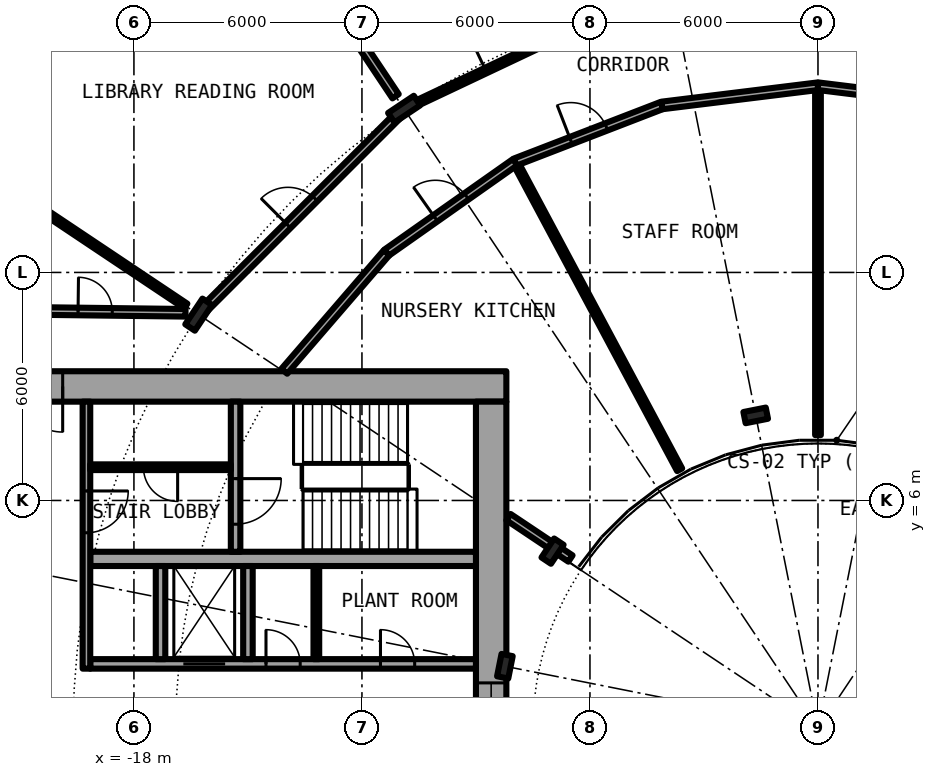
"""IFC4 building model, lengths in metres.
Left out: names, types, materials, properties, quantities, classifications, styles, units other than length and angle.
Written with IfcOpenShell. Run it as: python <this file> out.ifc"""

import sys

from ifc_helpers import new_model, si_unit, direction, frame, frame_2d, origin, origin_2d, place, context, subcontext, project, spatial, rectangle, i_section, extrude, element, fill, save


model = new_model("IFC4")
c1 = context("Model", 3, precision=1e-05, world=origin(), true_north=direction((0.0, 1.0)))
c2 = subcontext(c1, "Body", "Model", "MODEL_VIEW")
j1 = project(units=[si_unit("LENGTHUNIT", "METRE"), si_unit("PLANEANGLEUNIT", "RADIAN")], contexts=[c1])
p1 = place(None, origin())
s1 = spatial("IfcSite", under=j1, at=p1, CompositionType="ELEMENT")
p2 = place(p1, origin())
s2 = spatial("IfcBuilding", under=s1, at=p2, CompositionType="ELEMENT")
p3 = place(p2, frame((0.0, 0.0, 14.1)))
s3 = spatial("IfcBuildingStorey", under=s2, at=p3, CompositionType="ELEMENT", Elevation=14.1)
for number, where, z_axis, x_axis in (
    (1, (-10.889, 16.297, 0.0), (0.0, 0.0, 1.0), (-0.556, 0.831, 0.0)),
    (2, (-16.297, 10.889, 0.0), (0.0, 0.0, 1.0), (-0.831, 0.556, 0.0)),
):
    element("IfcColumn", number, at=place(p3, frame(where, z_axis=z_axis, x_axis=x_axis)), inside=s3, PredefinedType="COLUMN", context=c2, shape_type="SweptSolid", body=[
        extrude(i_section(OverallWidth=0.303, OverallDepth=0.814, WebThickness=0.021, FlangeThickness=0.04, FilletRadius=0.03, at=origin_2d()), origin(), (0.0, 0.0, 1.0), 4.2),
    ])
for number, where, z_axis, x_axis in (
    (3, (-1.639, 8.239, 0.0), (0.0, 0.0, 1.0), (-0.195, 0.981, 0.0)),
    (4, (-6.984, 4.667, 0.0), (0.0, 0.0, 1.0), (-0.831, 0.556, 0.0)),
    (5, (-8.239, 1.639, 0.0), (0.0, 0.0, 1.0), (-0.981, 0.195, 0.0)),
):
    element("IfcColumn", number, at=place(p3, frame(where, z_axis=z_axis, x_axis=x_axis)), inside=s3, PredefinedType="COLUMN", context=c2, shape_type="SweptSolid", body=[
        extrude(i_section(OverallWidth=0.3, OverallDepth=0.6, WebThickness=0.015, FlangeThickness=0.03, FilletRadius=0.027, at=origin_2d()), origin(), (0.0, 0.0, 1.0), 4.2),
    ])
p4 = place(p3, frame((-8.2, 9.0, 0.0), z_axis=(0.0, 0.0, 1.0), x_axis=(-1.0, 0.0, 0.0)))
e6 = element("IfcWall", 6, at=p4, inside=s3, PredefinedType="SHEAR", context=c2, shape_type="SweptSolid", body=[
    extrude(rectangle(XDim=14.2, YDim=0.8, at=frame_2d((7.1, 0.0))), origin(), (0.0, 0.0, 1.0), 4.2),
])
p5 = place(p4, frame((11.675, 0.0, 0.0)))
e7 = element("IfcOpeningElement", 7, at=p5, cuts=e6, PredefinedType="OPENING", context=c2, shape_type="SweptSolid", body=[
    extrude(rectangle(XDim=1.2, YDim=2.3, at=frame_2d((0.6, 1.15))), frame((0.0, 0.41, 0.0), z_axis=(0.0, -1.0, 0.0), x_axis=(1.0, 0.0, 0.0)), (0.0, 0.0, 1.0), 0.82),
])
p6 = place(p3, frame((-8.6, 8.6, 0.0), z_axis=(0.0, 0.0, 1.0), x_axis=(0.0, -1.0, 0.0)))
e8 = element("IfcWall", 8, at=p6, inside=s3, PredefinedType="SHEAR", context=c2, shape_type="SweptSolid", body=[
    extrude(rectangle(XDim=17.2, YDim=0.8, at=frame_2d((8.6, 0.0))), origin(), (0.0, 0.0, 1.0), 4.2),
])
p7 = place(p6, frame((7.4, 0.0, 0.1)))
e9 = element("IfcOpeningElement", 9, at=p7, cuts=e8, PredefinedType="OPENING", context=c2, shape_type="SweptSolid", body=[
    extrude(rectangle(XDim=2.4, YDim=2.2, at=frame_2d((1.2, 1.1))), frame((0.0, 0.41, 0.0), z_axis=(0.0, -1.0, 0.0), x_axis=(1.0, 0.0, 0.0)), (0.0, 0.0, 1.0), 0.82),
])
p8 = place(p3, frame((-19.15, 1.7, 0.0), z_axis=(0.0, 0.0, 1.0), x_axis=(1.0, 0.0, 0.0)))
e10 = element("IfcWall", 10, at=p8, inside=s3, PredefinedType="SHEAR", context=c2, shape_type="SweptSolid", body=[
    extrude(rectangle(XDim=10.15, YDim=0.25, at=frame_2d((5.075, 0.0))), origin(), (0.0, 0.0, 1.0), 4.2),
])
p9 = place(p8, frame((2.45, 0.0, 0.0)))
e11 = element("IfcOpeningElement", 11, at=p9, cuts=e10, PredefinedType="OPENING", context=c2, shape_type="SweptSolid", body=[
    extrude(rectangle(XDim=1.1, YDim=2.3, at=frame_2d((0.55, 1.15))), frame((0.0, 0.135, 0.0), z_axis=(0.0, -1.0, 0.0), x_axis=(1.0, 0.0, 0.0)), (0.0, 0.0, 1.0), 0.27),
])
p10 = place(p8, frame((7.637, 0.0, 0.0)))
e12 = element("IfcOpeningElement", 12, at=p10, cuts=e10, PredefinedType="OPENING", context=c2, shape_type="SweptSolid", body=[
    extrude(rectangle(XDim=0.9, YDim=2.3, at=frame_2d((0.45, 1.15))), frame((0.0, 0.135, 0.0), z_axis=(0.0, -1.0, 0.0), x_axis=(1.0, 0.0, 0.0)), (0.0, 0.0, 1.0), 0.27),
])
p11 = place(p8, frame((4.625, 0.0, 0.0)))
e13 = element("IfcOpeningElement", 13, at=p11, cuts=e10, PredefinedType="OPENING", context=c2, shape_type="SweptSolid", body=[
    extrude(rectangle(XDim=0.9, YDim=2.3, at=frame_2d((0.45, 1.15))), frame((0.0, 0.135, 0.0), z_axis=(0.0, -1.0, 0.0), x_axis=(1.0, 0.0, 0.0)), (0.0, 0.0, 1.0), 0.27),
])
p12 = place(p3, frame((-9.0, 4.462, 0.0), z_axis=(0.0, 0.0, 1.0), x_axis=(-1.0, 0.0, 0.0)))
e14 = element("IfcWall", 14, at=p12, inside=s3, PredefinedType="SHEAR", context=c2, shape_type="SweptSolid", body=[
    extrude(rectangle(XDim=10.15, YDim=0.375, at=frame_2d((5.075, 0.0))), origin(), (0.0, 0.0, 1.0), 4.2),
])
p13 = place(p3, frame((-15.325, 8.6, 0.0), z_axis=(0.0, 0.0, 1.0), x_axis=(0.0, -1.0, 0.0)))
e15 = element("IfcWall", 15, at=p13, inside=s3, PredefinedType="SHEAR", context=c2, shape_type="SweptSolid", body=[
    extrude(rectangle(XDim=3.95, YDim=0.25, at=frame_2d((1.975, 0.0))), origin(), (0.0, 0.0, 1.0), 4.2),
])
p14 = place(p13, frame((2.025, 0.0, 0.0)))
e16 = element("IfcOpeningElement", 16, at=p14, cuts=e15, PredefinedType="OPENING", context=c2, shape_type="SweptSolid", body=[
    extrude(rectangle(XDim=1.2, YDim=2.3, at=frame_2d((0.6, 1.15))), frame((0.0, 0.135, 0.0), z_axis=(0.0, -1.0, 0.0), x_axis=(1.0, 0.0, 0.0)), (0.0, 0.0, 1.0), 0.27),
])
for number, where, z_axis, x_axis in (
    (17, (-15.0, 1.825, 0.0), (0.0, 0.0, 1.0), (0.0, 1.0, 0.0)),
    (18, (-17.3, 1.825, 0.0), (0.0, 0.0, 1.0), (0.0, 1.0, 0.0)),
):
    element("IfcWall", number, at=place(p3, frame(where, z_axis=z_axis, x_axis=x_axis)), inside=s3, PredefinedType="SOLIDWALL", context=c2, shape_type="SweptSolid", body=[
        extrude(rectangle(XDim=2.45, YDim=0.25, at=frame_2d((1.225, 0.0))), origin(), (0.0, 0.0, 1.0), 3.8),
    ])
p15 = place(p3, frame((-19.25, 8.6, 0.0), z_axis=(0.0, 0.0, 1.0), x_axis=(0.0, -1.0, 0.0)))
e19 = element("IfcWall", 19, at=p15, inside=s3, PredefinedType="SOLIDWALL", context=c2, shape_type="SweptSolid", body=[
    extrude(rectangle(XDim=7.025, YDim=0.2, at=frame_2d((3.513, 0.0))), origin(), (0.0, 0.0, 1.0), 3.8),
])
p16 = place(p15, frame((2.35, 0.0, 0.0)))
e20 = element("IfcOpeningElement", 20, at=p16, cuts=e19, PredefinedType="OPENING", context=c2, shape_type="SweptSolid", body=[
    extrude(rectangle(XDim=1.1, YDim=2.3, at=frame_2d((0.55, 1.15))), frame((0.0, 0.11, 0.0), z_axis=(0.0, -1.0, 0.0), x_axis=(1.0, 0.0, 0.0)), (0.0, 0.0, 1.0), 0.22),
])
p17 = place(p3, frame((-13.2, 1.825, 0.0), z_axis=(0.0, 0.0, 1.0), x_axis=(0.0, 1.0, 0.0)))
e21 = element("IfcWall", 21, at=p17, inside=s3, PredefinedType="PARTITIONING", context=c2, shape_type="SweptSolid", body=[
    extrude(rectangle(XDim=2.45, YDim=0.15, at=frame_2d((1.225, 0.0))), origin(), (0.0, 0.0, 1.0), 3.8),
])
p18 = place(p3, frame((-15.45, 6.875, 0.0), z_axis=(0.0, 0.0, 1.0), x_axis=(-1.0, 0.0, 0.0)))
e22 = element("IfcWall", 22, at=p18, inside=s3, PredefinedType="PARTITIONING", context=c2, shape_type="SweptSolid", body=[
    extrude(rectangle(XDim=3.7, YDim=0.15, at=frame_2d((1.85, 0.0))), origin(), (0.0, 0.0, 1.0), 3.8),
])
p19 = place(p18, frame((1.4, 0.0, 0.0)))
e23 = element("IfcOpeningElement", 23, at=p19, cuts=e22, PredefinedType="OPENING", context=c2, shape_type="SweptSolid", body=[
    extrude(rectangle(XDim=0.9, YDim=2.3, at=frame_2d((0.45, 1.15))), frame((0.0, 0.085, 0.0), z_axis=(0.0, -1.0, 0.0), x_axis=(1.0, 0.0, 0.0)), (0.0, 0.0, 1.0), 0.17),
])
p20 = place(p3, frame((-22.595, 15.098, 0.0), z_axis=(0.0, 0.0, 1.0), x_axis=(0.831431488123, -0.555627285648, 0.0)))
e24 = element("IfcWall", 24, at=p20, inside=s3, PredefinedType="PARTITIONING", context=c2, shape_type="SweptSolid", body=[
    extrude(rectangle(XDim=7.168, YDim=0.15, at=frame_2d((3.584, 0.0))), origin(), (0.0, 0.0, 1.0), 3.8),
])
p21 = place(p3, frame((-12.222, 18.292, 0.0), z_axis=(0.0, 0.0, 1.0), x_axis=(0.555491592772, -0.831522152657, 0.0)))
e25 = element("IfcWall", 25, at=p21, inside=s3, PredefinedType="PARTITIONING", context=c2, shape_type="SweptSolid", body=[
    extrude(rectangle(XDim=1.993, YDim=0.2, at=frame_2d((0.996, 0.0))), origin(), (0.0, 0.0, 1.0), 3.8),
])
p22 = place(p3, frame((-7.968, 14.904, 0.0), z_axis=(0.0, 0.0, 1.0), x_axis=(0.471460365694, -0.881887251059, 0.0)))
e26 = element("IfcWall", 26, at=p22, inside=s3, PredefinedType="PARTITIONING", context=c2, shape_type="SweptSolid", body=[
    extrude(rectangle(XDim=9.18, YDim=0.15, at=frame_2d((4.59, 0.0))), origin(), (0.0, 0.0, 1.0), 3.8),
])
p23 = place(p3, frame((0.0, 7.72, 0.0), z_axis=(0.0, 0.0, 1.0), x_axis=(0.0, 1.0, 0.0)))
e27 = element("IfcWall", 27, at=p23, inside=s3, PredefinedType="PARTITIONING", context=c2, shape_type="SweptSolid", body=[
    extrude(rectangle(XDim=9.18, YDim=0.15, at=frame_2d((4.59, 0.0))), origin(), (0.0, 0.0, 1.0), 3.8),
])
p24 = place(p3, frame((-6.513, 4.472, 0.0), z_axis=(0.0, 0.0, 1.0), x_axis=(-0.831417956244, 0.555647533996, 0.0)))
e28 = element("IfcWall", 28, at=p24, inside=s3, PredefinedType="PARTITIONING", context=c2, shape_type="SweptSolid", body=[
    extrude(rectangle(XDim=1.962, YDim=0.2, at=frame_2d((0.981, 0.0))), origin(), (0.0, 0.0, 1.0), 3.8),
])
p25 = place(p3, frame((-21.675, 11.0, 0.0), z_axis=(0.0, 0.0, 1.0), x_axis=(0.999924074118, -0.012322580895, 0.0)))
e29 = element("IfcWall", 29, at=p25, inside=s3, PredefinedType="PARTITIONING", context=c2, shape_type="SweptSolid", body=[
    extrude(rectangle(XDim=5.032, YDim=0.2, at=frame_2d((2.516, 0.0))), origin(), (0.0, 0.0, 1.0), 3.8),
])
p26 = place(p25, frame((2.205, 0.0, 0.0)))
e30 = element("IfcOpeningElement", 30, at=p26, cuts=e29, PredefinedType="OPENING", context=c2, shape_type="SweptSolid", body=[
    extrude(rectangle(XDim=0.9, YDim=2.3, at=frame_2d((0.45, 1.15))), frame((0.0, 0.11, 0.0), z_axis=(0.0, -1.0, 0.0), x_axis=(1.0, 0.0, 0.0)), (0.0, 0.0, 1.0), 0.22),
])
p27 = place(p3, frame((-14.043, 9.4, 0.0), z_axis=(0.0, 0.0, 1.0), x_axis=(0.653274518104, 0.757121129012, 0.0)))
e31 = element("IfcWall", 31, at=p27, inside=s3, PredefinedType="PARTITIONING", context=c2, shape_type="SweptSolid", body=[
    extrude(rectangle(XDim=4.124, YDim=0.2, at=frame_2d((2.062, 0.0))), origin(), (0.0, 0.0, 1.0), 3.8),
])
p28 = place(p3, frame((-11.349, 12.522, 0.0), z_axis=(0.0, 0.0, 1.0), x_axis=(0.817567680547, 0.575832517079, 0.0)))
e32 = element("IfcWall", 32, at=p28, inside=s3, PredefinedType="PARTITIONING", context=c2, shape_type="SweptSolid", body=[
    extrude(rectangle(XDim=4.137, YDim=0.2, at=frame_2d((2.068, 0.0))), origin(), (0.0, 0.0, 1.0), 3.8),
])
p29 = place(p28, frame((1.568, 0.0, 0.0)))
e33 = element("IfcOpeningElement", 33, at=p29, cuts=e32, PredefinedType="OPENING", context=c2, shape_type="SweptSolid", body=[
    extrude(rectangle(XDim=1.0, YDim=2.3, at=frame_2d((0.5, 1.15))), frame((0.0, 0.11, 0.0), z_axis=(0.0, -1.0, 0.0), x_axis=(1.0, 0.0, 0.0)), (0.0, 0.0, 1.0), 0.22),
])
p30 = place(p3, frame((-7.967, 14.904, 0.0), z_axis=(0.0, 0.0, 1.0), x_axis=(0.932943640288, 0.360022449363, 0.0)))
e34 = element("IfcWall", 34, at=p30, inside=s3, PredefinedType="PARTITIONING", context=c2, shape_type="SweptSolid", body=[
    extrude(rectangle(XDim=4.139, YDim=0.2, at=frame_2d((2.069, 0.0))), origin(), (0.0, 0.0, 1.0), 3.8),
])
p31 = place(p30, frame((1.569, 0.0, 0.0)))
e35 = element("IfcOpeningElement", 35, at=p31, cuts=e34, PredefinedType="OPENING", context=c2, shape_type="SweptSolid", body=[
    extrude(rectangle(XDim=1.0, YDim=2.3, at=frame_2d((0.5, 1.15))), frame((0.0, 0.11, 0.0), z_axis=(0.0, -1.0, 0.0), x_axis=(1.0, 0.0, 0.0)), (0.0, 0.0, 1.0), 0.22),
])
for number, where, z_axis, x_axis in (
    (36, (-4.106, 16.394, 0.0), (0.0, 0.0, 1.0), (0.992, 0.122, 0.0)),
    (37, (0.0, 16.9, 0.0), (0.0, 0.0, 1.0), (0.992, -0.122, 0.0)),
):
    element("IfcWall", number, at=place(p3, frame(where, z_axis=z_axis, x_axis=x_axis)), inside=s3, PredefinedType="PARTITIONING", context=c2, shape_type="SweptSolid", body=[
        extrude(rectangle(XDim=4.137, YDim=0.2, at=frame_2d((2.068, 0.0))), origin(), (0.0, 0.0, 1.0), 3.8),
    ])
p32 = place(p3, frame((-16.188, 10.998, 0.0), z_axis=(0.0, 0.0, 1.0), x_axis=(0.707106781187, 0.707106781187, 0.0)))
e38 = element("IfcWall", 38, at=p32, inside=s3, PredefinedType="PARTITIONING", context=c2, shape_type="SweptSolid", body=[
    extrude(rectangle(XDim=7.34, YDim=0.2, at=frame_2d((3.67, 0.0))), origin(), (0.0, 0.0, 1.0), 3.38),
])
p33 = place(p32, frame((3.17, 0.0, 0.0)))
e39 = element("IfcOpeningElement", 39, at=p33, cuts=e38, PredefinedType="OPENING", context=c2, shape_type="SweptSolid", body=[
    extrude(rectangle(XDim=1.0, YDim=2.3, at=frame_2d((0.5, 1.15))), frame((0.0, 0.11, 0.0), z_axis=(0.0, -1.0, 0.0), x_axis=(1.0, 0.0, 0.0)), (0.0, 0.0, 1.0), 0.22),
])
p34 = place(p3, frame((-10.751, 16.362, 0.0), z_axis=(0.0, 0.0, 1.0), x_axis=(0.903965018344, 0.42760641437, 0.0)))
e40 = element("IfcWall", 40, at=p34, inside=s3, PredefinedType="PARTITIONING", context=c2, shape_type="SweptSolid", body=[
    extrude(rectangle(XDim=5.599, YDim=0.15, at=frame_2d((2.799, 0.0))), origin(), (0.0, 0.0, 1.0), 3.38),
])
p35 = place(p34, frame((2.223, 0.0, 0.0)))
e41 = element("IfcOpeningElement", 41, at=p35, cuts=e40, PredefinedType="OPENING", context=c2, shape_type="SweptSolid", body=[
    extrude(rectangle(XDim=1.0, YDim=2.3, at=frame_2d((0.5, 1.15))), frame((0.0, 0.085, 0.0), z_axis=(0.0, -1.0, 0.0), x_axis=(1.0, 0.0, 0.0)), (0.0, 0.0, 1.0), 0.17),
])
p36 = place(p9, origin())
e42 = element("IfcDoor", 42, at=p36, inside=s3, OperationType="DOUBLE_DOOR_SLIDING", PredefinedType="DOOR", context=c2, shape_type="SweptSolid", body=[
    extrude(rectangle(XDim=1.1, YDim=2.3, at=frame_2d((0.55, 1.15))), frame((0.0, 0.025, 0.0), z_axis=(0.0, -1.0, 0.0), x_axis=(1.0, 0.0, 0.0)), (0.0, 0.0, 1.0), 0.05),
])
fill(e11, e42)
p37 = place(p10, origin())
e43 = element("IfcDoor", 43, at=p37, inside=s3, OperationType="SINGLE_SWING_LEFT", PredefinedType="DOOR", context=c2, shape_type="SweptSolid", body=[
    extrude(rectangle(XDim=0.9, YDim=2.3, at=frame_2d((0.45, 1.15))), frame((0.0, 0.025, 0.0), z_axis=(0.0, -1.0, 0.0), x_axis=(1.0, 0.0, 0.0)), (0.0, 0.0, 1.0), 0.05),
])
fill(e12, e43)
p38 = place(p11, origin())
e44 = element("IfcDoor", 44, at=p38, inside=s3, OperationType="SINGLE_SWING_LEFT", PredefinedType="DOOR", context=c2, shape_type="SweptSolid", body=[
    extrude(rectangle(XDim=0.9, YDim=2.3, at=frame_2d((0.45, 1.15))), frame((0.0, 0.025, 0.0), z_axis=(0.0, -1.0, 0.0), x_axis=(1.0, 0.0, 0.0)), (0.0, 0.0, 1.0), 0.05),
])
fill(e13, e44)
p39 = place(p19, origin())
e45 = element("IfcDoor", 45, at=p39, inside=s3, OperationType="SINGLE_SWING_LEFT", PredefinedType="DOOR", context=c2, shape_type="SweptSolid", body=[
    extrude(rectangle(XDim=0.9, YDim=2.3, at=frame_2d((0.45, 1.15))), frame((0.0, 0.025, 0.0), z_axis=(0.0, -1.0, 0.0), x_axis=(1.0, 0.0, 0.0)), (0.0, 0.0, 1.0), 0.05),
])
fill(e23, e45)
p40 = place(p14, origin())
e46 = element("IfcDoor", 46, at=p40, inside=s3, OperationType="SINGLE_SWING_LEFT", PredefinedType="DOOR", context=c2, shape_type="SweptSolid", body=[
    extrude(rectangle(XDim=1.2, YDim=2.3, at=frame_2d((0.6, 1.15))), frame((0.0, 0.025, 0.0), z_axis=(0.0, -1.0, 0.0), x_axis=(1.0, 0.0, 0.0)), (0.0, 0.0, 1.0), 0.05),
])
fill(e16, e46)
p41 = place(p16, origin())
e47 = element("IfcDoor", 47, at=p41, inside=s3, OperationType="SINGLE_SWING_RIGHT", PredefinedType="DOOR", context=c2, shape_type="SweptSolid", body=[
    extrude(rectangle(XDim=1.1, YDim=2.3, at=frame_2d((0.55, 1.15))), frame((0.0, 0.025, 0.0), z_axis=(0.0, -1.0, 0.0), x_axis=(1.0, 0.0, 0.0)), (0.0, 0.0, 1.0), 0.05),
])
fill(e20, e47)
p42 = place(p5, origin())
e48 = element("IfcDoor", 48, at=p42, inside=s3, OperationType="SINGLE_SWING_LEFT", PredefinedType="DOOR", context=c2, shape_type="SweptSolid", body=[
    extrude(rectangle(XDim=1.2, YDim=2.3, at=frame_2d((0.6, 1.15))), frame((0.0, 0.025, 0.0), z_axis=(0.0, -1.0, 0.0), x_axis=(1.0, 0.0, 0.0)), (0.0, 0.0, 1.0), 0.05),
])
fill(e7, e48)
p43 = place(p7, origin())
e49 = element("IfcWindow", 49, at=p43, inside=s3, PartitioningType="SINGLE_PANEL", PredefinedType="WINDOW", context=c2, shape_type="SweptSolid", body=[
    extrude(rectangle(XDim=2.4, YDim=2.2, at=frame_2d((1.2, 1.1))), frame((0.0, 0.03, 0.0), z_axis=(0.0, -1.0, 0.0), x_axis=(1.0, 0.0, 0.0)), (0.0, 0.0, 1.0), 0.06),
])
fill(e9, e49)
p44 = place(p35, origin())
e50 = element("IfcDoor", 50, at=p44, inside=s3, OperationType="SINGLE_SWING_LEFT", PredefinedType="DOOR", context=c2, shape_type="SweptSolid", body=[
    extrude(rectangle(XDim=1.0, YDim=2.3, at=frame_2d((0.5, 1.15))), frame((0.0, 0.025, 0.0), z_axis=(0.0, -1.0, 0.0), x_axis=(1.0, 0.0, 0.0)), (0.0, 0.0, 1.0), 0.05),
])
fill(e41, e50)
p45 = place(p33, origin())
e51 = element("IfcDoor", 51, at=p45, inside=s3, OperationType="SINGLE_SWING_RIGHT", PredefinedType="DOOR", context=c2, shape_type="SweptSolid", body=[
    extrude(rectangle(XDim=1.0, YDim=2.3, at=frame_2d((0.5, 1.15))), frame((0.0, 0.025, 0.0), z_axis=(0.0, -1.0, 0.0), x_axis=(1.0, 0.0, 0.0)), (0.0, 0.0, 1.0), 0.05),
])
fill(e39, e51)
p46 = place(p31, origin())
e52 = element("IfcDoor", 52, at=p46, inside=s3, OperationType="SINGLE_SWING_RIGHT", PredefinedType="DOOR", context=c2, shape_type="SweptSolid", body=[
    extrude(rectangle(XDim=1.0, YDim=2.3, at=frame_2d((0.5, 1.15))), frame((0.0, 0.025, 0.0), z_axis=(0.0, -1.0, 0.0), x_axis=(1.0, 0.0, 0.0)), (0.0, 0.0, 1.0), 0.05),
])
fill(e35, e52)
p47 = place(p29, origin())
e53 = element("IfcDoor", 53, at=p47, inside=s3, OperationType="SINGLE_SWING_RIGHT", PredefinedType="DOOR", context=c2, shape_type="SweptSolid", body=[
    extrude(rectangle(XDim=1.0, YDim=2.3, at=frame_2d((0.5, 1.15))), frame((0.0, 0.025, 0.0), z_axis=(0.0, -1.0, 0.0), x_axis=(1.0, 0.0, 0.0)), (0.0, 0.0, 1.0), 0.05),
])
fill(e33, e53)
p48 = place(p26, origin())
e54 = element("IfcDoor", 54, at=p48, inside=s3, OperationType="SINGLE_SWING_RIGHT", PredefinedType="DOOR", context=c2, shape_type="SweptSolid", body=[
    extrude(rectangle(XDim=0.9, YDim=2.3, at=frame_2d((0.45, 1.15))), frame((0.0, 0.025, 0.0), z_axis=(0.0, -1.0, 0.0), x_axis=(1.0, 0.0, 0.0)), (0.0, 0.0, 1.0), 0.05),
])
fill(e30, e54)
save(model, sys.argv[1])
